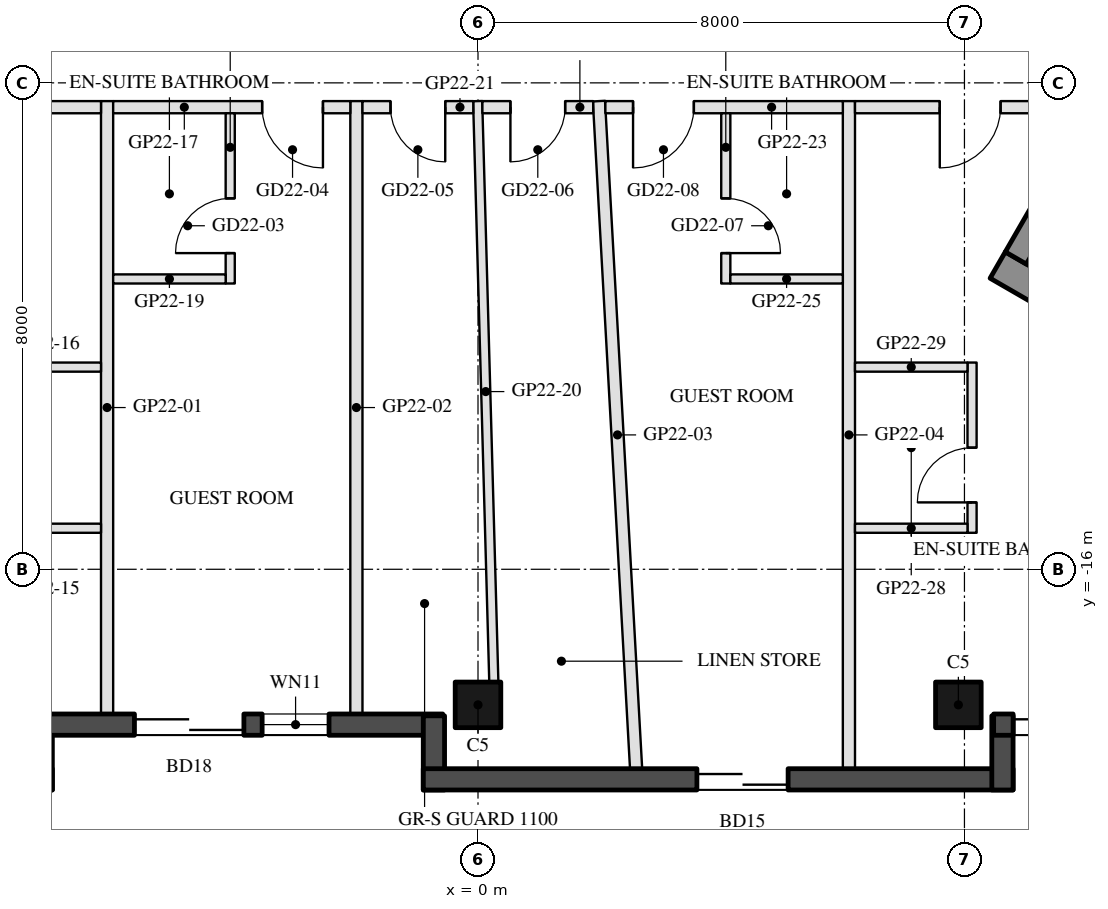
"""IFC4 building model, lengths in metres.
Left out: names, types, materials, properties, quantities, classifications, styles, units other than length and angle.
Written with IfcOpenShell. Run it as: python <this file> out.ifc"""

import sys

from ifc_helpers import new_model, si_unit, direction, frame, frame_2d, origin, origin_2d, place, context, subcontext, project, spatial, rectangle, hollow_rectangle, extrude, element, fill, save


model = new_model("IFC4")
c1 = context("Model", 3, precision=1e-05, world=origin(), true_north=direction((0.0, 1.0)))
c2 = subcontext(c1, "Body", "Model", "MODEL_VIEW")
j1 = project(units=[si_unit("LENGTHUNIT", "METRE"), si_unit("PLANEANGLEUNIT", "RADIAN")], contexts=[c1])
p1 = place(None, origin())
s1 = spatial("IfcSite", under=j1, at=p1, CompositionType="ELEMENT")
p2 = place(p1, origin())
s2 = spatial("IfcBuilding", under=s1, at=p2, CompositionType="ELEMENT")
p3 = place(p2, frame((0.0, 0.0, 228.0)))
s3 = spatial("IfcBuildingStorey", under=s2, at=p3, CompositionType="ELEMENT", Elevation=228.0)
for number, where, z_axis, x_axis in (
    (1, (0.0, -18.23, 0.0), (0.0, 0.0, 1.0), (-1.0, 0.0, 0.0)),
    (2, (7.9, -18.23, 0.0), (0.0, 0.0, 1.0), (-1.0, 0.0, 0.0)),
):
    element("IfcColumn", number, at=place(p3, frame(where, z_axis=z_axis, x_axis=x_axis)), inside=s3, PredefinedType="COLUMN", context=c2, shape_type="SweptSolid", body=[
        extrude(hollow_rectangle(XDim=0.75, YDim=0.75, WallThickness=0.035, at=origin_2d()), origin(), (0.0, 0.0, 1.0), 3.7),
    ])
p4 = place(p3, frame((-7.32, -18.555, 0.0), z_axis=(0.0, 0.0, 1.0), x_axis=(1.0, 0.0, 0.0)))
e3 = element("IfcWall", 3, at=p4, inside=s3, PredefinedType="SOLIDWALL", context=c2, shape_type="SweptSolid", body=[
    extrude(rectangle(XDim=6.74, YDim=0.35, at=frame_2d((3.37, 0.0))), origin(), (0.0, 0.0, 1.0), 3.45),
])
p5 = place(p4, frame((1.67, 0.0, 0.0)))
e4 = element("IfcOpeningElement", 4, at=p5, cuts=e3, PredefinedType="OPENING", context=c2, shape_type="SweptSolid", body=[
    extrude(rectangle(XDim=1.8, YDim=2.4, at=frame_2d((0.9, 1.2))), frame((0.0, 0.185, 0.0), z_axis=(0.0, -1.0, 0.0), x_axis=(1.0, 0.0, 0.0)), (0.0, 0.0, 1.0), 0.37),
])
p6 = place(p4, frame((3.77, 0.0, 0.3)))
e5 = element("IfcOpeningElement", 5, at=p6, cuts=e3, PredefinedType="OPENING", context=c2, shape_type="SweptSolid", body=[
    extrude(rectangle(XDim=1.1, YDim=2.65, at=frame_2d((0.55, 1.325))), frame((0.0, 0.185, 0.0), z_axis=(0.0, -1.0, 0.0), x_axis=(1.0, 0.0, 0.0)), (0.0, 0.0, 1.0), 0.37),
])
p7 = place(p3, frame((-0.725, -18.41, 0.0), z_axis=(0.0, 0.0, 1.0), x_axis=(0.0, -1.0, 0.0)))
e6 = element("IfcWall", 6, at=p7, inside=s3, PredefinedType="SOLIDWALL", context=c2, shape_type="SweptSolid", body=[
    extrude(rectangle(XDim=1.22, YDim=0.35, at=frame_2d((0.61, 0.0))), origin(), (0.0, 0.0, 1.0), 3.45),
])
p8 = place(p3, frame((-0.9, -19.455, 0.0), z_axis=(0.0, 0.0, 1.0), x_axis=(1.0, 0.0, 0.0)))
e7 = element("IfcWall", 7, at=p8, inside=s3, PredefinedType="SOLIDWALL", context=c2, shape_type="SweptSolid", body=[
    extrude(rectangle(XDim=9.7, YDim=0.35, at=frame_2d((4.85, 0.0))), origin(), (0.0, 0.0, 1.0), 3.45),
])
p9 = place(p8, frame((4.5, 0.0, 0.0)))
e8 = element("IfcOpeningElement", 8, at=p9, cuts=e7, PredefinedType="OPENING", context=c2, shape_type="SweptSolid", body=[
    extrude(rectangle(XDim=1.5, YDim=2.4, at=frame_2d((0.75, 1.2))), frame((0.0, 0.185, 0.0), z_axis=(0.0, -1.0, 0.0), x_axis=(1.0, 0.0, 0.0)), (0.0, 0.0, 1.0), 0.37),
])
p10 = place(p3, frame((8.625, -19.63, 0.0), z_axis=(0.0, 0.0, 1.0), x_axis=(0.0, 1.0, 0.0)))
e9 = element("IfcWall", 9, at=p10, inside=s3, PredefinedType="SOLIDWALL", context=c2, shape_type="SweptSolid", body=[
    extrude(rectangle(XDim=1.22, YDim=0.35, at=frame_2d((0.61, 0.0))), origin(), (0.0, 0.0, 1.0), 3.45),
])
p11 = place(p3, frame((8.48, -18.555, 0.0), z_axis=(0.0, 0.0, 1.0), x_axis=(1.0, 0.0, 0.0)))
e10 = element("IfcWall", 10, at=p11, inside=s3, PredefinedType="SOLIDWALL", context=c2, shape_type="SweptSolid", body=[
    extrude(rectangle(XDim=6.74, YDim=0.35, at=frame_2d((3.37, 0.0))), origin(), (0.0, 0.0, 1.0), 3.45),
])
p12 = place(p11, frame((0.32, 0.0, 0.0)))
e11 = element("IfcOpeningElement", 11, at=p12, cuts=e10, PredefinedType="OPENING", context=c2, shape_type="SweptSolid", body=[
    extrude(rectangle(XDim=2.4, YDim=2.4, at=frame_2d((1.2, 1.2))), frame((0.0, 0.185, 0.0), z_axis=(0.0, -1.0, 0.0), x_axis=(1.0, 0.0, 0.0)), (0.0, 0.0, 1.0), 0.37),
])
p13 = place(p11, frame((3.02, 0.0, 0.3)))
e12 = element("IfcOpeningElement", 12, at=p13, cuts=e10, PredefinedType="OPENING", context=c2, shape_type="SweptSolid", body=[
    extrude(rectangle(XDim=2.9, YDim=2.65, at=frame_2d((1.45, 1.325))), frame((0.0, 0.185, 0.0), z_axis=(0.0, -1.0, 0.0), x_axis=(1.0, 0.0, 0.0)), (0.0, 0.0, 1.0), 0.37),
])
p14 = place(p3, frame((8.547, -10.997, 0.0), z_axis=(0.0, 0.0, 1.0), x_axis=(0.866025009528, -0.500000682871, 0.0)))
e13 = element("IfcWall", 13, at=p14, inside=s3, PredefinedType="SHEAR", context=c2, shape_type="SweptSolid", body=[
    extrude(rectangle(XDim=14.837, YDim=0.5, at=frame_2d((7.418, 0.0))), origin(), (0.0, 0.0, 1.0), 3.45),
])
p15 = place(p3, frame((8.845, -10.88, 0.0), z_axis=(0.0, 0.0, 1.0), x_axis=(0.500004234368, 0.866022959057, 0.0)))
e14 = element("IfcWall", 14, at=p15, inside=s3, PredefinedType="SHEAR", context=c2, shape_type="SweptSolid", body=[
    extrude(rectangle(XDim=10.0, YDim=0.4, at=frame_2d((5.0, 0.0))), origin(), (0.0, 0.0, 1.0), 3.45),
])
p16 = place(p15, frame((3.55, 0.0, 0.0)))
e15 = element("IfcOpeningElement", 15, at=p16, cuts=e14, PredefinedType="OPENING", context=c2, shape_type="SweptSolid", body=[
    extrude(rectangle(XDim=1.1, YDim=2.1, at=frame_2d((0.55, 1.05))), frame((0.0, 0.21, 0.0), z_axis=(0.0, -1.0, 0.0), x_axis=(1.0, 0.0, 0.0)), (0.0, 0.0, 1.0), 0.42),
])
p17 = place(p15, frame((5.85, 0.0, 0.0)))
e16 = element("IfcOpeningElement", 16, at=p17, cuts=e14, PredefinedType="OPENING", context=c2, shape_type="SweptSolid", body=[
    extrude(rectangle(XDim=1.4, YDim=2.1, at=frame_2d((0.7, 1.05))), frame((0.0, 0.21, 0.0), z_axis=(0.0, -1.0, 0.0), x_axis=(1.0, 0.0, 0.0)), (0.0, 0.0, 1.0), 0.42),
])
for number, where, z_axis, x_axis in (
    (17, (-6.1, -18.38, 0.0), (0.0, 0.0, 1.0), (0.0, 1.0, 0.0)),
    (18, (-2.0, -18.38, 0.0), (0.0, 0.0, 1.0), (0.0, 1.0, 0.0)),
):
    element("IfcWall", number, at=place(p3, frame(where, z_axis=z_axis, x_axis=x_axis)), inside=s3, PredefinedType="PARTITIONING", context=c2, shape_type="SweptSolid", body=[
        extrude(rectangle(XDim=10.08, YDim=0.2, at=frame_2d((5.04, 0.0))), origin(), (0.0, 0.0, 1.0), 2.96),
    ])
p18 = place(p3, frame((2.6, -19.28, 0.0), z_axis=(0.0, 0.0, 1.0), x_axis=(-0.055568385591, 0.998454883569, 0.0)))
e19 = element("IfcWall", 19, at=p18, inside=s3, PredefinedType="PARTITIONING", context=c2, shape_type="SweptSolid", body=[
    extrude(rectangle(XDim=10.997, YDim=0.2, at=frame_2d((5.499, 0.0))), origin(), (0.0, 0.0, 1.0), 2.96),
])
p19 = place(p3, frame((6.1, -19.28, 0.0), z_axis=(0.0, 0.0, 1.0), x_axis=(0.0, 1.0, 0.0)))
e20 = element("IfcWall", 20, at=p19, inside=s3, PredefinedType="PARTITIONING", context=c2, shape_type="SweptSolid", body=[
    extrude(rectangle(XDim=10.98, YDim=0.2, at=frame_2d((5.49, 0.0))), origin(), (0.0, 0.0, 1.0), 2.96),
])
p20 = place(p3, frame((-6.2, -8.4, 0.0), z_axis=(0.0, 0.0, 1.0), x_axis=(-1.0, 0.0, 0.0)))
e21 = element("IfcWall", 21, at=p20, inside=s3, PredefinedType="PARTITIONING", context=c2, shape_type="SweptSolid", body=[
    extrude(rectangle(XDim=3.788, YDim=0.2, at=frame_2d((1.894, 0.0))), origin(), (0.0, 0.0, 1.0), 2.76),
])
p21 = place(p20, frame((1.394, 0.0, 0.0)))
e22 = element("IfcOpeningElement", 22, at=p21, cuts=e21, PredefinedType="OPENING", context=c2, shape_type="SweptSolid", body=[
    extrude(rectangle(XDim=1.0, YDim=2.1, at=frame_2d((0.5, 1.05))), frame((0.0, 0.11, 0.0), z_axis=(0.0, -1.0, 0.0), x_axis=(1.0, 0.0, 0.0)), (0.0, 0.0, 1.0), 0.22),
])
for number, where, z_axis, x_axis in (
    (23, (-8.05, -15.325, 0.0), (0.0, 0.0, 1.0), (1.0, 0.0, 0.0)),
    (24, (-8.05, -12.675, 0.0), (0.0, 0.0, 1.0), (1.0, 0.0, 0.0)),
):
    element("IfcWall", number, at=place(p3, frame(where, z_axis=z_axis, x_axis=x_axis)), inside=s3, PredefinedType="PARTITIONING", context=c2, shape_type="SweptSolid", body=[
        extrude(rectangle(XDim=1.85, YDim=0.15, at=frame_2d((0.925, 0.0))), origin(), (0.0, 0.0, 1.0), 2.76),
    ])
p22 = place(p3, frame((-2.1, -8.4, 0.0), z_axis=(0.0, 0.0, 1.0), x_axis=(-1.0, 0.0, 0.0)))
e25 = element("IfcWall", 25, at=p22, inside=s3, PredefinedType="PARTITIONING", context=c2, shape_type="SweptSolid", body=[
    extrude(rectangle(XDim=3.9, YDim=0.2, at=frame_2d((1.95, 0.0))), origin(), (0.0, 0.0, 1.0), 2.76),
])
p23 = place(p22, frame((0.45, 0.0, 0.0)))
e26 = element("IfcOpeningElement", 26, at=p23, cuts=e25, PredefinedType="OPENING", context=c2, shape_type="SweptSolid", body=[
    extrude(rectangle(XDim=1.0, YDim=2.1, at=frame_2d((0.5, 1.05))), frame((0.0, 0.11, 0.0), z_axis=(0.0, -1.0, 0.0), x_axis=(1.0, 0.0, 0.0)), (0.0, 0.0, 1.0), 0.22),
])
p24 = place(p3, frame((-4.075, -11.3, 0.0), z_axis=(0.0, 0.0, 1.0), x_axis=(0.0, 1.0, 0.0)))
e27 = element("IfcWall", 27, at=p24, inside=s3, PredefinedType="PARTITIONING", context=c2, shape_type="SweptSolid", body=[
    extrude(rectangle(XDim=2.8, YDim=0.15, at=frame_2d((1.4, 0.0))), origin(), (0.0, 0.0, 1.0), 2.76),
])
p25 = place(p24, frame((0.5, 0.0, 0.0)))
e28 = element("IfcOpeningElement", 28, at=p25, cuts=e27, PredefinedType="OPENING", context=c2, shape_type="SweptSolid", body=[
    extrude(rectangle(XDim=0.9, YDim=2.1, at=frame_2d((0.45, 1.05))), frame((0.0, 0.085, 0.0), z_axis=(0.0, -1.0, 0.0), x_axis=(1.0, 0.0, 0.0)), (0.0, 0.0, 1.0), 0.17),
])
p26 = place(p3, frame((-6.0, -11.225, 0.0), z_axis=(0.0, 0.0, 1.0), x_axis=(1.0, 0.0, 0.0)))
e29 = element("IfcWall", 29, at=p26, inside=s3, PredefinedType="PARTITIONING", context=c2, shape_type="SweptSolid", body=[
    extrude(rectangle(XDim=1.85, YDim=0.15, at=frame_2d((0.925, 0.0))), origin(), (0.0, 0.0, 1.0), 3.45),
])
p27 = place(p3, frame((0.26, -17.855, 0.0), z_axis=(0.0, 0.0, 1.0), x_axis=(-0.02781456591, 0.999613100116, 0.0)))
e30 = element("IfcWall", 30, at=p27, inside=s3, PredefinedType="PARTITIONING", context=c2, shape_type="SweptSolid", body=[
    extrude(rectangle(XDim=9.559, YDim=0.15, at=frame_2d((4.779, 0.0))), origin(), (0.0, 0.0, 1.0), 2.76),
])
p28 = place(p3, frame((-0.078, -8.4, 0.0), z_axis=(0.0, 0.0, 1.0), x_axis=(-1.0, 0.0, 0.0)))
e31 = element("IfcWall", 31, at=p28, inside=s3, PredefinedType="PARTITIONING", context=c2, shape_type="SweptSolid", body=[
    extrude(rectangle(XDim=1.822, YDim=0.2, at=frame_2d((0.911, 0.0))), origin(), (0.0, 0.0, 1.0), 2.76),
])
p29 = place(p28, frame((0.461, 0.0, 0.0)))
e32 = element("IfcOpeningElement", 32, at=p29, cuts=e31, PredefinedType="OPENING", context=c2, shape_type="SweptSolid", body=[
    extrude(rectangle(XDim=0.9, YDim=2.1, at=frame_2d((0.45, 1.05))), frame((0.0, 0.11, 0.0), z_axis=(0.0, -1.0, 0.0), x_axis=(1.0, 0.0, 0.0)), (0.0, 0.0, 1.0), 0.22),
])
p30 = place(p3, frame((1.894, -8.4, 0.0), z_axis=(0.0, 0.0, 1.0), x_axis=(-1.0, 0.0, 0.0)))
e33 = element("IfcWall", 33, at=p30, inside=s3, PredefinedType="PARTITIONING", context=c2, shape_type="SweptSolid", body=[
    extrude(rectangle(XDim=1.822, YDim=0.2, at=frame_2d((0.911, 0.0))), origin(), (0.0, 0.0, 1.0), 2.76),
])
p31 = place(p30, frame((0.461, 0.0, 0.0)))
e34 = element("IfcOpeningElement", 34, at=p31, cuts=e33, PredefinedType="OPENING", context=c2, shape_type="SweptSolid", body=[
    extrude(rectangle(XDim=0.9, YDim=2.1, at=frame_2d((0.45, 1.05))), frame((0.0, 0.11, 0.0), z_axis=(0.0, -1.0, 0.0), x_axis=(1.0, 0.0, 0.0)), (0.0, 0.0, 1.0), 0.22),
])
p32 = place(p3, frame((6.0, -8.4, 0.0), z_axis=(0.0, 0.0, 1.0), x_axis=(-1.0, 0.0, 0.0)))
e35 = element("IfcWall", 35, at=p32, inside=s3, PredefinedType="PARTITIONING", context=c2, shape_type="SweptSolid", body=[
    extrude(rectangle(XDim=3.906, YDim=0.2, at=frame_2d((1.953, 0.0))), origin(), (0.0, 0.0, 1.0), 2.76),
])
p33 = place(p32, frame((2.45, 0.0, 0.0)))
e36 = element("IfcOpeningElement", 36, at=p33, cuts=e35, PredefinedType="OPENING", context=c2, shape_type="SweptSolid", body=[
    extrude(rectangle(XDim=1.0, YDim=2.1, at=frame_2d((0.5, 1.05))), frame((0.0, 0.11, 0.0), z_axis=(0.0, -1.0, 0.0), x_axis=(1.0, 0.0, 0.0)), (0.0, 0.0, 1.0), 0.22),
])
p34 = place(p3, frame((4.075, -8.5, 0.0), z_axis=(0.0, 0.0, 1.0), x_axis=(0.0, -1.0, 0.0)))
e37 = element("IfcWall", 37, at=p34, inside=s3, PredefinedType="PARTITIONING", context=c2, shape_type="SweptSolid", body=[
    extrude(rectangle(XDim=2.8, YDim=0.15, at=frame_2d((1.4, 0.0))), origin(), (0.0, 0.0, 1.0), 2.76),
])
p35 = place(p34, frame((1.4, 0.0, 0.0)))
e38 = element("IfcOpeningElement", 38, at=p35, cuts=e37, PredefinedType="OPENING", context=c2, shape_type="SweptSolid", body=[
    extrude(rectangle(XDim=0.9, YDim=2.1, at=frame_2d((0.45, 1.05))), frame((0.0, 0.085, 0.0), z_axis=(0.0, -1.0, 0.0), x_axis=(1.0, 0.0, 0.0)), (0.0, 0.0, 1.0), 0.17),
])
p36 = place(p3, frame((4.15, -11.225, 0.0), z_axis=(0.0, 0.0, 1.0), x_axis=(1.0, 0.0, 0.0)))
e39 = element("IfcWall", 39, at=p36, inside=s3, PredefinedType="PARTITIONING", context=c2, shape_type="SweptSolid", body=[
    extrude(rectangle(XDim=1.85, YDim=0.15, at=frame_2d((0.925, 0.0))), origin(), (0.0, 0.0, 1.0), 3.45),
])
p37 = place(p3, frame((9.988, -8.4, 0.0), z_axis=(0.0, 0.0, 1.0), x_axis=(-1.0, 0.0, 0.0)))
e40 = element("IfcWall", 40, at=p37, inside=s3, PredefinedType="PARTITIONING", context=c2, shape_type="SweptSolid", body=[
    extrude(rectangle(XDim=3.788, YDim=0.2, at=frame_2d((1.894, 0.0))), origin(), (0.0, 0.0, 1.0), 2.76),
])
p38 = place(p37, frame((1.394, 0.0, 0.0)))
e41 = element("IfcOpeningElement", 41, at=p38, cuts=e40, PredefinedType="OPENING", context=c2, shape_type="SweptSolid", body=[
    extrude(rectangle(XDim=1.0, YDim=2.1, at=frame_2d((0.5, 1.05))), frame((0.0, 0.11, 0.0), z_axis=(0.0, -1.0, 0.0), x_axis=(1.0, 0.0, 0.0)), (0.0, 0.0, 1.0), 0.22),
])
p39 = place(p3, frame((8.125, -15.4, 0.0), z_axis=(0.0, 0.0, 1.0), x_axis=(0.0, 1.0, 0.0)))
e42 = element("IfcWall", 42, at=p39, inside=s3, PredefinedType="PARTITIONING", context=c2, shape_type="SweptSolid", body=[
    extrude(rectangle(XDim=2.8, YDim=0.15, at=frame_2d((1.4, 0.0))), origin(), (0.0, 0.0, 1.0), 3.45),
])
p40 = place(p39, frame((0.5, 0.0, 0.0)))
e43 = element("IfcOpeningElement", 43, at=p40, cuts=e42, PredefinedType="OPENING", context=c2, shape_type="SweptSolid", body=[
    extrude(rectangle(XDim=0.9, YDim=2.1, at=frame_2d((0.45, 1.05))), frame((0.0, 0.085, 0.0), z_axis=(0.0, -1.0, 0.0), x_axis=(1.0, 0.0, 0.0)), (0.0, 0.0, 1.0), 0.17),
])
for number, where, z_axis, x_axis in (
    (44, (6.2, -15.325, 0.0), (0.0, 0.0, 1.0), (1.0, 0.0, 0.0)),
    (45, (6.2, -12.675, 0.0), (0.0, 0.0, 1.0), (1.0, 0.0, 0.0)),
):
    element("IfcWall", number, at=place(p3, frame(where, z_axis=z_axis, x_axis=x_axis)), inside=s3, PredefinedType="PARTITIONING", context=c2, shape_type="SweptSolid", body=[
        extrude(rectangle(XDim=1.85, YDim=0.15, at=frame_2d((0.925, 0.0))), origin(), (0.0, 0.0, 1.0), 2.76),
    ])
p41 = place(p5, frame((1.8, 0.0, 0.0), z_axis=(0.0, 0.0, 1.0), x_axis=(-1.0, 0.0, 0.0)))
e46 = element("IfcDoor", 46, at=p41, inside=s3, OperationType="SLIDING_TO_LEFT", PredefinedType="DOOR", context=c2, shape_type="SweptSolid", body=[
    extrude(rectangle(XDim=1.8, YDim=2.4, at=frame_2d((0.9, 1.2))), frame((0.0, 0.025, 0.0), z_axis=(0.0, -1.0, 0.0), x_axis=(1.0, 0.0, 0.0)), (0.0, 0.0, 1.0), 0.05),
])
fill(e4, e46)
p42 = place(p6, origin())
e47 = element("IfcWindow", 47, at=p42, inside=s3, PartitioningType="SINGLE_PANEL", PredefinedType="WINDOW", context=c2, shape_type="SweptSolid", body=[
    extrude(rectangle(XDim=1.1, YDim=2.65, at=frame_2d((0.55, 1.325))), frame((0.0, 0.03, 0.0), z_axis=(0.0, -1.0, 0.0), x_axis=(1.0, 0.0, 0.0)), (0.0, 0.0, 1.0), 0.06),
])
fill(e5, e47)
p43 = place(p9, frame((1.5, 0.0, 0.0), z_axis=(0.0, 0.0, 1.0), x_axis=(-1.0, 0.0, 0.0)))
e48 = element("IfcDoor", 48, at=p43, inside=s3, OperationType="SLIDING_TO_LEFT", PredefinedType="DOOR", context=c2, shape_type="SweptSolid", body=[
    extrude(rectangle(XDim=1.5, YDim=2.4, at=frame_2d((0.75, 1.2))), frame((0.0, 0.025, 0.0), z_axis=(0.0, -1.0, 0.0), x_axis=(1.0, 0.0, 0.0)), (0.0, 0.0, 1.0), 0.05),
])
fill(e8, e48)
p44 = place(p12, frame((2.4, 0.0, 0.0), z_axis=(0.0, 0.0, 1.0), x_axis=(-1.0, 0.0, 0.0)))
e49 = element("IfcDoor", 49, at=p44, inside=s3, OperationType="SLIDING_TO_LEFT", PredefinedType="DOOR", context=c2, shape_type="SweptSolid", body=[
    extrude(rectangle(XDim=2.4, YDim=2.4, at=frame_2d((1.2, 1.2))), frame((0.0, 0.025, 0.0), z_axis=(0.0, -1.0, 0.0), x_axis=(1.0, 0.0, 0.0)), (0.0, 0.0, 1.0), 0.05),
])
fill(e11, e49)
p45 = place(p25, origin())
e50 = element("IfcDoor", 50, at=p45, inside=s3, OperationType="SINGLE_SWING_LEFT", PredefinedType="DOOR", context=c2, shape_type="SweptSolid", body=[
    extrude(rectangle(XDim=0.9, YDim=2.1, at=frame_2d((0.45, 1.05))), frame((0.0, 0.025, 0.0), z_axis=(0.0, -1.0, 0.0), x_axis=(1.0, 0.0, 0.0)), (0.0, 0.0, 1.0), 0.05),
])
fill(e28, e50)
p46 = place(p23, origin())
e51 = element("IfcDoor", 51, at=p46, inside=s3, OperationType="SINGLE_SWING_LEFT", PredefinedType="DOOR", context=c2, shape_type="SweptSolid", body=[
    extrude(rectangle(XDim=1.0, YDim=2.1, at=frame_2d((0.5, 1.05))), frame((0.0, 0.025, 0.0), z_axis=(0.0, -1.0, 0.0), x_axis=(1.0, 0.0, 0.0)), (0.0, 0.0, 1.0), 0.05),
])
fill(e26, e51)
p47 = place(p29, origin())
e52 = element("IfcDoor", 52, at=p47, inside=s3, OperationType="SINGLE_SWING_LEFT", PredefinedType="DOOR", context=c2, shape_type="SweptSolid", body=[
    extrude(rectangle(XDim=0.9, YDim=2.1, at=frame_2d((0.45, 1.05))), frame((0.0, 0.025, 0.0), z_axis=(0.0, -1.0, 0.0), x_axis=(1.0, 0.0, 0.0)), (0.0, 0.0, 1.0), 0.05),
])
fill(e32, e52)
p48 = place(p31, origin())
e53 = element("IfcDoor", 53, at=p48, inside=s3, OperationType="SINGLE_SWING_RIGHT", PredefinedType="DOOR", context=c2, shape_type="SweptSolid", body=[
    extrude(rectangle(XDim=0.9, YDim=2.1, at=frame_2d((0.45, 1.05))), frame((0.0, 0.025, 0.0), z_axis=(0.0, -1.0, 0.0), x_axis=(1.0, 0.0, 0.0)), (0.0, 0.0, 1.0), 0.05),
])
fill(e34, e53)
p49 = place(p35, origin())
e54 = element("IfcDoor", 54, at=p49, inside=s3, OperationType="SINGLE_SWING_RIGHT", PredefinedType="DOOR", context=c2, shape_type="SweptSolid", body=[
    extrude(rectangle(XDim=0.9, YDim=2.1, at=frame_2d((0.45, 1.05))), frame((0.0, 0.025, 0.0), z_axis=(0.0, -1.0, 0.0), x_axis=(1.0, 0.0, 0.0)), (0.0, 0.0, 1.0), 0.05),
])
fill(e38, e54)
p50 = place(p33, origin())
e55 = element("IfcDoor", 55, at=p50, inside=s3, OperationType="SINGLE_SWING_RIGHT", PredefinedType="DOOR", context=c2, shape_type="SweptSolid", body=[
    extrude(rectangle(XDim=1.0, YDim=2.1, at=frame_2d((0.5, 1.05))), frame((0.0, 0.025, 0.0), z_axis=(0.0, -1.0, 0.0), x_axis=(1.0, 0.0, 0.0)), (0.0, 0.0, 1.0), 0.05),
])
fill(e36, e55)
p51 = place(p40, origin())
e56 = element("IfcDoor", 56, at=p51, inside=s3, OperationType="SINGLE_SWING_LEFT", PredefinedType="DOOR", context=c2, shape_type="SweptSolid", body=[
    extrude(rectangle(XDim=0.9, YDim=2.1, at=frame_2d((0.45, 1.05))), frame((0.0, 0.025, 0.0), z_axis=(0.0, -1.0, 0.0), x_axis=(1.0, 0.0, 0.0)), (0.0, 0.0, 1.0), 0.05),
])
fill(e43, e56)
p52 = place(p38, origin())
e57 = element("IfcDoor", 57, at=p52, inside=s3, OperationType="SINGLE_SWING_RIGHT", PredefinedType="DOOR", context=c2, shape_type="SweptSolid", body=[
    extrude(rectangle(XDim=1.0, YDim=2.1, at=frame_2d((0.5, 1.05))), frame((0.0, 0.025, 0.0), z_axis=(0.0, -1.0, 0.0), x_axis=(1.0, 0.0, 0.0)), (0.0, 0.0, 1.0), 0.05),
])
fill(e41, e57)
save(model, sys.argv[1])
